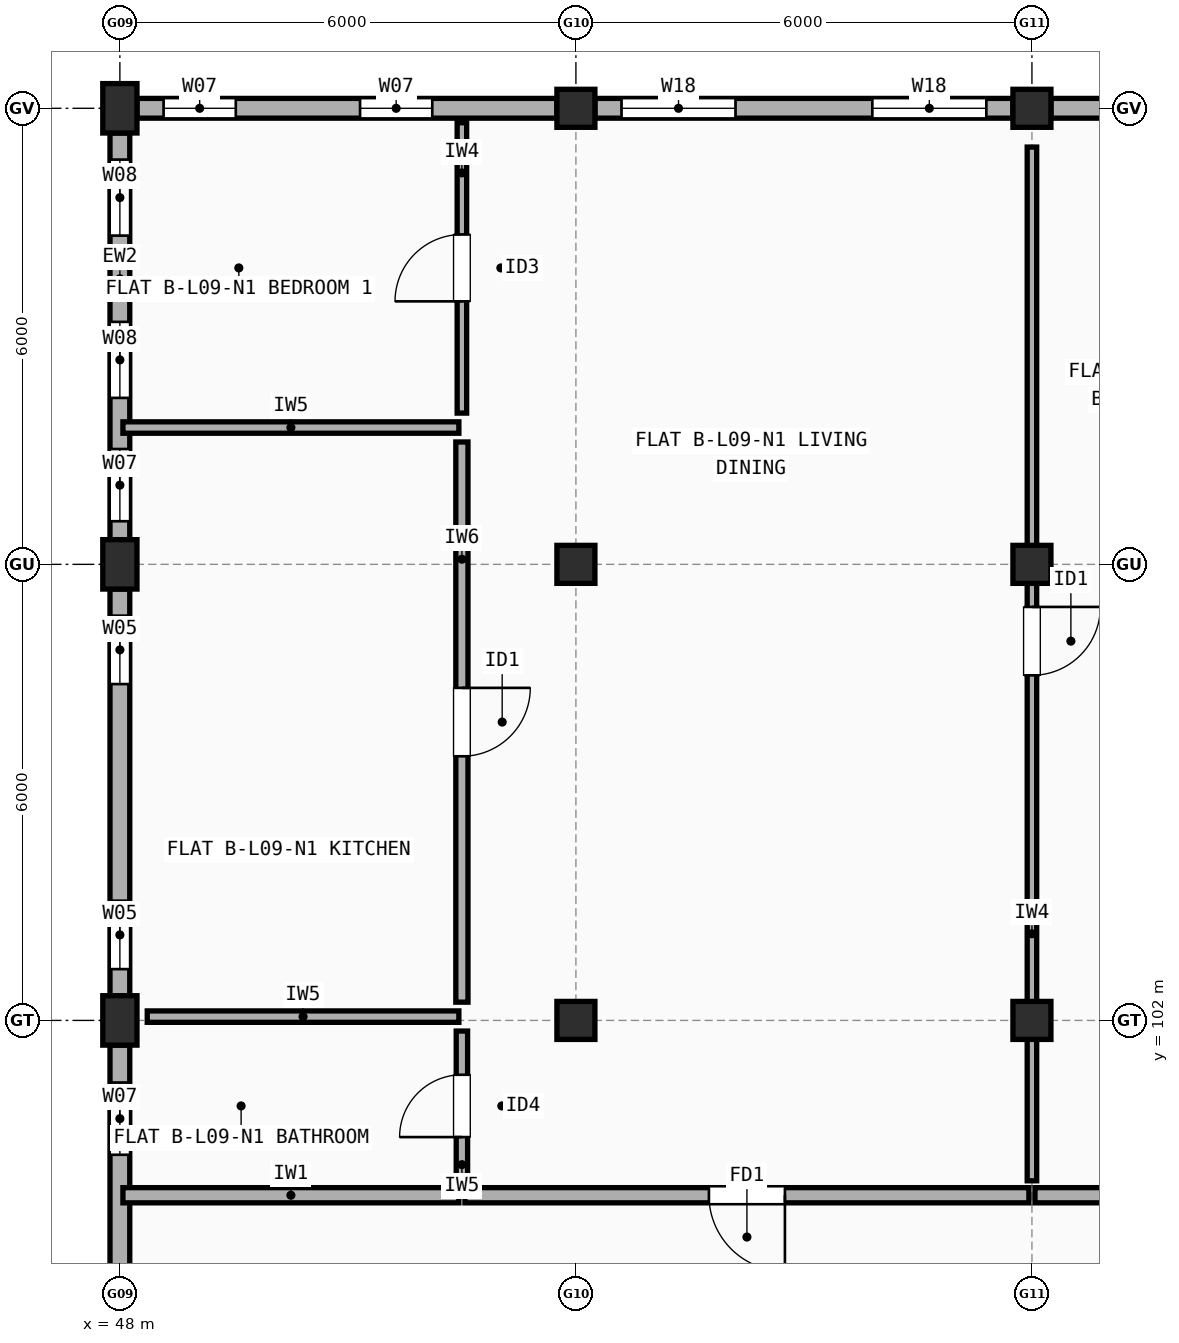
"""IFC4 building model, lengths in metres.
Left out: names, types, materials, properties, quantities, classifications, styles, units other than length and angle.
Written with IfcOpenShell. Run it as: python <this file> out.ifc"""

import sys

from ifc_helpers import new_model, si_unit, direction, frame, frame_2d, origin, origin_2d, place, context, subcontext, project, spatial, rectangle, extrude, element, fill, save


model = new_model("IFC4")
c1 = context("Model", 3, precision=1e-05, world=origin(), true_north=direction((0.0, 1.0)))
c2 = subcontext(c1, "Body", "Model", "MODEL_VIEW")
j1 = project(units=[si_unit("LENGTHUNIT", "METRE"), si_unit("PLANEANGLEUNIT", "RADIAN")], contexts=[c1])
p1 = place(None, origin())
s1 = spatial("IfcSite", under=j1, at=p1, CompositionType="ELEMENT")
p2 = place(p1, origin())
s2 = spatial("IfcBuilding", under=s1, at=p2, CompositionType="ELEMENT")
p3 = place(p2, frame((0.0, 0.0, 30.1)))
s3 = spatial("IfcBuildingStorey", under=s2, at=p3, CompositionType="ELEMENT", Elevation=30.1)
for number, where, z_axis, x_axis in (
    (1, (48.0, 102.0, 0.0), (0.0, 0.0, 1.0), (1.0, 0.0, 0.0)),
    (2, (48.0, 108.0, 0.0), (0.0, 0.0, 1.0), (1.0, 0.0, 0.0)),
    (3, (48.0, 114.0, 0.0), (0.0, 0.0, 1.0), (1.0, 0.0, 0.0)),
):
    element("IfcColumn", number, at=place(p3, frame(where, z_axis=z_axis, x_axis=x_axis)), inside=s3, PredefinedType="COLUMN", context=c2, shape_type="SweptSolid", body=[
        extrude(rectangle(XDim=0.45, YDim=0.65, at=origin_2d()), origin(), (0.0, 0.0, 1.0), 2.985),
    ])
for number, where, z_axis, x_axis in (
    (4, (54.0, 102.0, 0.0), (0.0, 0.0, 1.0), (1.0, 0.0, 0.0)),
    (5, (54.0, 108.0, 0.0), (0.0, 0.0, 1.0), (1.0, 0.0, 0.0)),
    (6, (54.0, 114.0, 0.0), (0.0, 0.0, 1.0), (1.0, 0.0, 0.0)),
    (7, (60.0, 102.0, 0.0), (0.0, 0.0, 1.0), (1.0, 0.0, 0.0)),
    (8, (60.0, 108.0, 0.0), (0.0, 0.0, 1.0), (1.0, 0.0, 0.0)),
    (9, (60.0, 114.0, 0.0), (0.0, 0.0, 1.0), (1.0, 0.0, 0.0)),
):
    element("IfcColumn", number, at=place(p3, frame(where, z_axis=z_axis, x_axis=x_axis)), inside=s3, PredefinedType="COLUMN", context=c2, shape_type="SweptSolid", body=[
        extrude(rectangle(XDim=0.5, YDim=0.5, at=origin_2d()), origin(), (0.0, 0.0, 1.0), 2.985),
    ])
p4 = place(p3, frame((65.75, 114.0, 0.0), z_axis=(0.0, 0.0, 1.0), x_axis=(-1.0, 0.0, 0.0)))
e10 = element("IfcWall", 10, at=p4, inside=s3, PredefinedType="STANDARD", context=c2, shape_type="SweptSolid", body=[
    extrude(rectangle(XDim=5.5, YDim=0.26, at=frame_2d((2.75, 0.0))), origin(), (0.0, 0.0, 1.0), 2.467),
])
p5 = place(p4, frame((0.83, 0.0, 0.9)))
e11 = element("IfcOpeningElement", 11, at=p5, cuts=e10, PredefinedType="OPENING", context=c2, shape_type="SweptSolid", body=[
    extrude(rectangle(XDim=1.05, YDim=1.35, at=frame_2d((0.525, 0.675))), frame((0.0, 0.14, 0.0), z_axis=(0.0, -1.0, 0.0), x_axis=(1.0, 0.0, 0.0)), (0.0, 0.0, 1.0), 0.28),
])
p6 = place(p4, frame((3.545, 0.0, 0.9)))
e12 = element("IfcOpeningElement", 12, at=p6, cuts=e10, PredefinedType="OPENING", context=c2, shape_type="SweptSolid", body=[
    extrude(rectangle(XDim=1.2, YDim=1.35, at=frame_2d((0.6, 0.675))), frame((0.0, 0.14, 0.0), z_axis=(0.0, -1.0, 0.0), x_axis=(1.0, 0.0, 0.0)), (0.0, 0.0, 1.0), 0.28),
])
p7 = place(p3, frame((59.75, 114.0, 0.0), z_axis=(0.0, 0.0, 1.0), x_axis=(-1.0, 0.0, 0.0)))
e13 = element("IfcWall", 13, at=p7, inside=s3, PredefinedType="STANDARD", context=c2, shape_type="SweptSolid", body=[
    extrude(rectangle(XDim=5.5, YDim=0.26, at=frame_2d((2.75, 0.0))), origin(), (0.0, 0.0, 1.0), 2.467),
])
p8 = place(p7, frame((0.35, 0.0, 0.9)))
e14 = element("IfcOpeningElement", 14, at=p8, cuts=e13, PredefinedType="OPENING", context=c2, shape_type="SweptSolid", body=[
    extrude(rectangle(XDim=1.5, YDim=1.4, at=frame_2d((0.75, 0.7))), frame((0.0, 0.14, 0.0), z_axis=(0.0, -1.0, 0.0), x_axis=(1.0, 0.0, 0.0)), (0.0, 0.0, 1.0), 0.28),
])
p9 = place(p7, frame((3.65, 0.0, 0.9)))
e15 = element("IfcOpeningElement", 15, at=p9, cuts=e13, PredefinedType="OPENING", context=c2, shape_type="SweptSolid", body=[
    extrude(rectangle(XDim=1.5, YDim=1.4, at=frame_2d((0.75, 0.7))), frame((0.0, 0.14, 0.0), z_axis=(0.0, -1.0, 0.0), x_axis=(1.0, 0.0, 0.0)), (0.0, 0.0, 1.0), 0.28),
])
p10 = place(p3, frame((53.75, 114.0, 0.0), z_axis=(0.0, 0.0, 1.0), x_axis=(-1.0, 0.0, 0.0)))
e16 = element("IfcWall", 16, at=p10, inside=s3, PredefinedType="STANDARD", context=c2, shape_type="SweptSolid", body=[
    extrude(rectangle(XDim=5.525, YDim=0.26, at=frame_2d((2.762, 0.0))), origin(), (0.0, 0.0, 1.0), 2.467),
])
p11 = place(p10, frame((1.64, 0.0, 0.9)))
e17 = element("IfcOpeningElement", 17, at=p11, cuts=e16, PredefinedType="OPENING", context=c2, shape_type="SweptSolid", body=[
    extrude(rectangle(XDim=0.95, YDim=1.35, at=frame_2d((0.475, 0.675))), frame((0.0, 0.14, 0.0), z_axis=(0.0, -1.0, 0.0), x_axis=(1.0, 0.0, 0.0)), (0.0, 0.0, 1.0), 0.28),
])
p12 = place(p10, frame((4.225, 0.0, 0.9)))
e18 = element("IfcOpeningElement", 18, at=p12, cuts=e16, PredefinedType="OPENING", context=c2, shape_type="SweptSolid", body=[
    extrude(rectangle(XDim=0.95, YDim=1.35, at=frame_2d((0.475, 0.675))), frame((0.0, 0.14, 0.0), z_axis=(0.0, -1.0, 0.0), x_axis=(1.0, 0.0, 0.0)), (0.0, 0.0, 1.0), 0.28),
])
p13 = place(p3, frame((48.0, 113.675, 0.0), z_axis=(0.0, 0.0, 1.0), x_axis=(0.0, -1.0, 0.0)))
e19 = element("IfcWall", 19, at=p13, inside=s3, PredefinedType="STANDARD", context=c2, shape_type="SweptSolid", body=[
    extrude(rectangle(XDim=5.35, YDim=0.26, at=frame_2d((2.675, 0.0))), origin(), (0.0, 0.0, 1.0), 2.467),
])
p14 = place(p13, frame((0.35, 0.0, 0.9)))
e20 = element("IfcOpeningElement", 20, at=p14, cuts=e19, PredefinedType="OPENING", context=c2, shape_type="SweptSolid", body=[
    extrude(rectangle(XDim=1.0, YDim=1.4, at=frame_2d((0.5, 0.7))), frame((0.0, 0.14, 0.0), z_axis=(0.0, -1.0, 0.0), x_axis=(1.0, 0.0, 0.0)), (0.0, 0.0, 1.0), 0.28),
])
p15 = place(p13, frame((2.485, 0.0, 0.9)))
e21 = element("IfcOpeningElement", 21, at=p15, cuts=e19, PredefinedType="OPENING", context=c2, shape_type="SweptSolid", body=[
    extrude(rectangle(XDim=1.0, YDim=1.4, at=frame_2d((0.5, 0.7))), frame((0.0, 0.14, 0.0), z_axis=(0.0, -1.0, 0.0), x_axis=(1.0, 0.0, 0.0)), (0.0, 0.0, 1.0), 0.28),
])
p16 = place(p13, frame((4.157, 0.0, 0.9)))
e22 = element("IfcOpeningElement", 22, at=p16, cuts=e19, PredefinedType="OPENING", context=c2, shape_type="SweptSolid", body=[
    extrude(rectangle(XDim=0.95, YDim=1.35, at=frame_2d((0.475, 0.675))), frame((0.0, 0.14, 0.0), z_axis=(0.0, -1.0, 0.0), x_axis=(1.0, 0.0, 0.0)), (0.0, 0.0, 1.0), 0.28),
])
p17 = place(p3, frame((48.0, 107.675, 0.0), z_axis=(0.0, 0.0, 1.0), x_axis=(0.0, -1.0, 0.0)))
e23 = element("IfcWall", 23, at=p17, inside=s3, PredefinedType="STANDARD", context=c2, shape_type="SweptSolid", body=[
    extrude(rectangle(XDim=5.35, YDim=0.26, at=frame_2d((2.675, 0.0))), origin(), (0.0, 0.0, 1.0), 2.467),
])
p18 = place(p17, frame((0.35, 0.0, 0.9)))
e24 = element("IfcOpeningElement", 24, at=p18, cuts=e23, PredefinedType="OPENING", context=c2, shape_type="SweptSolid", body=[
    extrude(rectangle(XDim=0.9, YDim=1.4, at=frame_2d((0.45, 0.7))), frame((0.0, 0.14, 0.0), z_axis=(0.0, -1.0, 0.0), x_axis=(1.0, 0.0, 0.0)), (0.0, 0.0, 1.0), 0.28),
])
p19 = place(p17, frame((4.1, 0.0, 0.9)))
e25 = element("IfcOpeningElement", 25, at=p19, cuts=e23, PredefinedType="OPENING", context=c2, shape_type="SweptSolid", body=[
    extrude(rectangle(XDim=0.9, YDim=1.4, at=frame_2d((0.45, 0.7))), frame((0.0, 0.14, 0.0), z_axis=(0.0, -1.0, 0.0), x_axis=(1.0, 0.0, 0.0)), (0.0, 0.0, 1.0), 0.28),
])
p20 = place(p3, frame((48.0, 101.675, 0.0), z_axis=(0.0, 0.0, 1.0), x_axis=(0.0, -1.0, 0.0)))
e26 = element("IfcWall", 26, at=p20, inside=s3, PredefinedType="STANDARD", context=c2, shape_type="SweptSolid", body=[
    extrude(rectangle(XDim=5.35, YDim=0.26, at=frame_2d((2.675, 0.0))), origin(), (0.0, 0.0, 1.0), 2.467),
])
p21 = place(p20, frame((0.492, 0.0, 0.9)))
e27 = element("IfcOpeningElement", 27, at=p21, cuts=e26, PredefinedType="OPENING", context=c2, shape_type="SweptSolid", body=[
    extrude(rectangle(XDim=0.95, YDim=1.35, at=frame_2d((0.475, 0.675))), frame((0.0, 0.14, 0.0), z_axis=(0.0, -1.0, 0.0), x_axis=(1.0, 0.0, 0.0)), (0.0, 0.0, 1.0), 0.28),
])
p22 = place(p20, frame((3.157, 0.0, 0.9)))
e28 = element("IfcOpeningElement", 28, at=p22, cuts=e26, PredefinedType="OPENING", context=c2, shape_type="SweptSolid", body=[
    extrude(rectangle(XDim=1.05, YDim=1.35, at=frame_2d((0.525, 0.675))), frame((0.0, 0.14, 0.0), z_axis=(0.0, -1.0, 0.0), x_axis=(1.0, 0.0, 0.0)), (0.0, 0.0, 1.0), 0.28),
])
p23 = place(p3, frame((48.04, 99.7, 0.0), z_axis=(0.0, 0.0, 1.0), x_axis=(1.0, 0.0, 0.0)))
e29 = element("IfcWall", 29, at=p23, inside=s3, PredefinedType="SOLIDWALL", context=c2, shape_type="SweptSolid", body=[
    extrude(rectangle(XDim=4.42, YDim=0.2, at=frame_2d((2.21, 0.0))), origin(), (0.0, 0.0, 1.0), 2.467),
])
p24 = place(p3, frame((52.54, 99.7, 0.0), z_axis=(0.0, 0.0, 1.0), x_axis=(1.0, 0.0, 0.0)))
e30 = element("IfcWall", 30, at=p24, inside=s3, PredefinedType="SOLIDWALL", context=c2, shape_type="SweptSolid", body=[
    extrude(rectangle(XDim=7.42, YDim=0.2, at=frame_2d((3.71, 0.0))), origin(), (0.0, 0.0, 1.0), 2.508),
])
p25 = place(p24, frame((3.21, 0.0, 0.0)))
e31 = element("IfcOpeningElement", 31, at=p25, cuts=e30, PredefinedType="OPENING", context=c2, shape_type="SweptSolid", body=[
    extrude(rectangle(XDim=1.0, YDim=2.15, at=frame_2d((0.5, 1.075))), frame((0.0, 0.11, 0.0), z_axis=(0.0, -1.0, 0.0), x_axis=(1.0, 0.0, 0.0)), (0.0, 0.0, 1.0), 0.22),
])
p26 = place(p3, frame((52.5, 109.99, 0.0), z_axis=(0.0, 0.0, 1.0), x_axis=(0.0, 1.0, 0.0)))
e32 = element("IfcWall", 32, at=p26, inside=s3, PredefinedType="PARTITIONING", context=c2, shape_type="SweptSolid", body=[
    extrude(rectangle(XDim=3.82, YDim=0.125, at=frame_2d((1.91, 0.0))), origin(), (0.0, 0.0, 1.0), 2.985),
])
p27 = place(p26, frame((1.47, 0.0, 0.0)))
e33 = element("IfcOpeningElement", 33, at=p27, cuts=e32, PredefinedType="OPENING", context=c2, shape_type="SweptSolid", body=[
    extrude(rectangle(XDim=0.88, YDim=2.1, at=frame_2d((0.44, 1.05))), frame((0.0, 0.073, 0.0), z_axis=(0.0, -1.0, 0.0), x_axis=(1.0, 0.0, 0.0)), (0.0, 0.0, 1.0), 0.145),
])
p28 = place(p3, frame((52.5, 102.24, 0.0), z_axis=(0.0, 0.0, 1.0), x_axis=(0.0, 1.0, 0.0)))
e34 = element("IfcWall", 34, at=p28, inside=s3, PredefinedType="PLUMBINGWALL", context=c2, shape_type="SweptSolid", body=[
    extrude(rectangle(XDim=7.37, YDim=0.16, at=frame_2d((3.685, 0.0))), origin(), (0.0, 0.0, 1.0), 2.467),
])
p29 = place(p28, frame((3.235, 0.0, 0.0)))
e35 = element("IfcOpeningElement", 35, at=p29, cuts=e34, PredefinedType="OPENING", context=c2, shape_type="SweptSolid", body=[
    extrude(rectangle(XDim=0.9, YDim=2.1, at=frame_2d((0.45, 1.05))), frame((0.0, 0.09, 0.0), z_axis=(0.0, -1.0, 0.0), x_axis=(1.0, 0.0, 0.0)), (0.0, 0.0, 1.0), 0.18),
])
p30 = place(p3, frame((52.5, 99.89, 0.0), z_axis=(0.0, 0.0, 1.0), x_axis=(0.0, 1.0, 0.0)))
e36 = element("IfcWall", 36, at=p30, inside=s3, PredefinedType="PARTITIONING", context=c2, shape_type="SweptSolid", body=[
    extrude(rectangle(XDim=1.97, YDim=0.15, at=frame_2d((0.985, 0.0))), origin(), (0.0, 0.0, 1.0), 2.985),
])
p31 = place(p30, frame((0.575, 0.0, 0.0)))
e37 = element("IfcOpeningElement", 37, at=p31, cuts=e36, PredefinedType="OPENING", context=c2, shape_type="SweptSolid", body=[
    extrude(rectangle(XDim=0.82, YDim=2.08, at=frame_2d((0.41, 1.04))), frame((0.0, 0.085, 0.0), z_axis=(0.0, -1.0, 0.0), x_axis=(1.0, 0.0, 0.0)), (0.0, 0.0, 1.0), 0.17),
])
p32 = place(p3, frame((48.04, 109.8, 0.0), z_axis=(0.0, 0.0, 1.0), x_axis=(1.0, 0.0, 0.0)))
e38 = element("IfcWall", 38, at=p32, inside=s3, PredefinedType="PARTITIONING", context=c2, shape_type="SweptSolid", body=[
    extrude(rectangle(XDim=4.42, YDim=0.15, at=frame_2d((2.21, 0.0))), origin(), (0.0, 0.0, 1.0), 2.467),
])
p33 = place(p3, frame((48.36, 102.05, 0.0), z_axis=(0.0, 0.0, 1.0), x_axis=(1.0, 0.0, 0.0)))
e39 = element("IfcWall", 39, at=p33, inside=s3, PredefinedType="PARTITIONING", context=c2, shape_type="SweptSolid", body=[
    extrude(rectangle(XDim=4.1, YDim=0.15, at=frame_2d((2.05, 0.0))), origin(), (0.0, 0.0, 1.0), 2.467),
])
p34 = place(p3, frame((60.04, 99.7, 0.0), z_axis=(0.0, 0.0, 1.0), x_axis=(1.0, 0.0, 0.0)))
e40 = element("IfcWall", 40, at=p34, inside=s3, PredefinedType="SOLIDWALL", context=c2, shape_type="SweptSolid", body=[
    extrude(rectangle(XDim=2.92, YDim=0.2, at=frame_2d((1.46, 0.0))), origin(), (0.0, 0.0, 1.0), 2.508),
])
p35 = place(p3, frame((60.0, 99.89, 0.0), z_axis=(0.0, 0.0, 1.0), x_axis=(0.0, 1.0, 0.0)))
e41 = element("IfcWall", 41, at=p35, inside=s3, PredefinedType="PARTITIONING", context=c2, shape_type="SweptSolid", body=[
    extrude(rectangle(XDim=13.6, YDim=0.125, at=frame_2d((6.8, 0.0))), origin(), (0.0, 0.0, 1.0), 2.508),
])
p36 = place(p35, frame((6.65, 0.0, 0.0)))
e42 = element("IfcOpeningElement", 42, at=p36, cuts=e41, PredefinedType="OPENING", context=c2, shape_type="SweptSolid", body=[
    extrude(rectangle(XDim=0.9, YDim=2.1, at=frame_2d((0.45, 1.05))), frame((0.0, 0.073, 0.0), z_axis=(0.0, -1.0, 0.0), x_axis=(1.0, 0.0, 0.0)), (0.0, 0.0, 1.0), 0.145),
])
p37 = place(p8, origin())
e43 = element("IfcWindow", 43, at=p37, inside=s3, PartitioningType="SINGLE_PANEL", PredefinedType="WINDOW", context=c2, shape_type="SweptSolid", body=[
    extrude(rectangle(XDim=1.5, YDim=1.4, at=frame_2d((0.75, 0.7))), frame((0.0, 0.03, 0.0), z_axis=(0.0, -1.0, 0.0), x_axis=(1.0, 0.0, 0.0)), (0.0, 0.0, 1.0), 0.06),
])
fill(e14, e43)
p38 = place(p9, origin())
e44 = element("IfcWindow", 44, at=p38, inside=s3, PartitioningType="SINGLE_PANEL", PredefinedType="WINDOW", context=c2, shape_type="SweptSolid", body=[
    extrude(rectangle(XDim=1.5, YDim=1.4, at=frame_2d((0.75, 0.7))), frame((0.0, 0.03, 0.0), z_axis=(0.0, -1.0, 0.0), x_axis=(1.0, 0.0, 0.0)), (0.0, 0.0, 1.0), 0.06),
])
fill(e15, e44)
p39 = place(p11, origin())
e45 = element("IfcWindow", 45, at=p39, inside=s3, PartitioningType="SINGLE_PANEL", PredefinedType="WINDOW", context=c2, shape_type="SweptSolid", body=[
    extrude(rectangle(XDim=0.95, YDim=1.35, at=frame_2d((0.475, 0.675))), frame((0.0, 0.03, 0.0), z_axis=(0.0, -1.0, 0.0), x_axis=(1.0, 0.0, 0.0)), (0.0, 0.0, 1.0), 0.06),
])
fill(e17, e45)
p40 = place(p12, origin())
e46 = element("IfcWindow", 46, at=p40, inside=s3, PartitioningType="SINGLE_PANEL", PredefinedType="WINDOW", context=c2, shape_type="SweptSolid", body=[
    extrude(rectangle(XDim=0.95, YDim=1.35, at=frame_2d((0.475, 0.675))), frame((0.0, 0.03, 0.0), z_axis=(0.0, -1.0, 0.0), x_axis=(1.0, 0.0, 0.0)), (0.0, 0.0, 1.0), 0.06),
])
fill(e18, e46)
p41 = place(p14, origin())
e47 = element("IfcWindow", 47, at=p41, inside=s3, PartitioningType="SINGLE_PANEL", PredefinedType="WINDOW", context=c2, shape_type="SweptSolid", body=[
    extrude(rectangle(XDim=1.0, YDim=1.4, at=frame_2d((0.5, 0.7))), frame((0.0, 0.03, 0.0), z_axis=(0.0, -1.0, 0.0), x_axis=(1.0, 0.0, 0.0)), (0.0, 0.0, 1.0), 0.06),
])
fill(e20, e47)
p42 = place(p15, origin())
e48 = element("IfcWindow", 48, at=p42, inside=s3, PartitioningType="SINGLE_PANEL", PredefinedType="WINDOW", context=c2, shape_type="SweptSolid", body=[
    extrude(rectangle(XDim=1.0, YDim=1.4, at=frame_2d((0.5, 0.7))), frame((0.0, 0.03, 0.0), z_axis=(0.0, -1.0, 0.0), x_axis=(1.0, 0.0, 0.0)), (0.0, 0.0, 1.0), 0.06),
])
fill(e21, e48)
p43 = place(p16, origin())
e49 = element("IfcWindow", 49, at=p43, inside=s3, PartitioningType="SINGLE_PANEL", PredefinedType="WINDOW", context=c2, shape_type="SweptSolid", body=[
    extrude(rectangle(XDim=0.95, YDim=1.35, at=frame_2d((0.475, 0.675))), frame((0.0, 0.03, 0.0), z_axis=(0.0, -1.0, 0.0), x_axis=(1.0, 0.0, 0.0)), (0.0, 0.0, 1.0), 0.06),
])
fill(e22, e49)
p44 = place(p18, origin())
e50 = element("IfcWindow", 50, at=p44, inside=s3, PartitioningType="SINGLE_PANEL", PredefinedType="WINDOW", context=c2, shape_type="SweptSolid", body=[
    extrude(rectangle(XDim=0.9, YDim=1.4, at=frame_2d((0.45, 0.7))), frame((0.0, 0.03, 0.0), z_axis=(0.0, -1.0, 0.0), x_axis=(1.0, 0.0, 0.0)), (0.0, 0.0, 1.0), 0.06),
])
fill(e24, e50)
p45 = place(p19, origin())
e51 = element("IfcWindow", 51, at=p45, inside=s3, PartitioningType="SINGLE_PANEL", PredefinedType="WINDOW", context=c2, shape_type="SweptSolid", body=[
    extrude(rectangle(XDim=0.9, YDim=1.4, at=frame_2d((0.45, 0.7))), frame((0.0, 0.03, 0.0), z_axis=(0.0, -1.0, 0.0), x_axis=(1.0, 0.0, 0.0)), (0.0, 0.0, 1.0), 0.06),
])
fill(e25, e51)
p46 = place(p21, origin())
e52 = element("IfcWindow", 52, at=p46, inside=s3, PartitioningType="SINGLE_PANEL", PredefinedType="WINDOW", context=c2, shape_type="SweptSolid", body=[
    extrude(rectangle(XDim=0.95, YDim=1.35, at=frame_2d((0.475, 0.675))), frame((0.0, 0.03, 0.0), z_axis=(0.0, -1.0, 0.0), x_axis=(1.0, 0.0, 0.0)), (0.0, 0.0, 1.0), 0.06),
])
fill(e27, e52)
p47 = place(p25, origin())
e53 = element("IfcDoor", 53, at=p47, inside=s3, OperationType="SINGLE_SWING_RIGHT", PredefinedType="DOOR", context=c2, shape_type="SweptSolid", body=[
    extrude(rectangle(XDim=1.0, YDim=2.15, at=frame_2d((0.5, 1.075))), frame((0.0, 0.025, 0.0), z_axis=(0.0, -1.0, 0.0), x_axis=(1.0, 0.0, 0.0)), (0.0, 0.0, 1.0), 0.05),
])
fill(e31, e53)
p48 = place(p27, origin())
e54 = element("IfcDoor", 54, at=p48, inside=s3, OperationType="SINGLE_SWING_LEFT", PredefinedType="DOOR", context=c2, shape_type="SweptSolid", body=[
    extrude(rectangle(XDim=0.88, YDim=2.1, at=frame_2d((0.44, 1.05))), frame((0.0, 0.025, 0.0), z_axis=(0.0, -1.0, 0.0), x_axis=(1.0, 0.0, 0.0)), (0.0, 0.0, 1.0), 0.05),
])
fill(e33, e54)
p49 = place(p29, origin())
e55 = element("IfcDoor", 55, at=p49, inside=s3, OperationType="SINGLE_SWING_RIGHT", PredefinedType="DOOR", context=c2, shape_type="SweptSolid", body=[
    extrude(rectangle(XDim=0.9, YDim=2.1, at=frame_2d((0.45, 1.05))), frame((0.0, 0.025, 0.0), z_axis=(0.0, -1.0, 0.0), x_axis=(1.0, 0.0, 0.0)), (0.0, 0.0, 1.0), 0.05),
])
fill(e35, e55)
p50 = place(p31, origin())
e56 = element("IfcDoor", 56, at=p50, inside=s3, OperationType="SINGLE_SWING_LEFT", PredefinedType="DOOR", context=c2, shape_type="SweptSolid", body=[
    extrude(rectangle(XDim=0.82, YDim=2.08, at=frame_2d((0.41, 1.04))), frame((0.0, 0.025, 0.0), z_axis=(0.0, -1.0, 0.0), x_axis=(1.0, 0.0, 0.0)), (0.0, 0.0, 1.0), 0.05),
])
fill(e37, e56)
p51 = place(p36, origin())
e57 = element("IfcDoor", 57, at=p51, inside=s3, OperationType="SINGLE_SWING_RIGHT", PredefinedType="DOOR", context=c2, shape_type="SweptSolid", body=[
    extrude(rectangle(XDim=0.9, YDim=2.1, at=frame_2d((0.45, 1.05))), frame((0.0, 0.025, 0.0), z_axis=(0.0, -1.0, 0.0), x_axis=(1.0, 0.0, 0.0)), (0.0, 0.0, 1.0), 0.05),
])
fill(e42, e57)
save(model, sys.argv[1])
